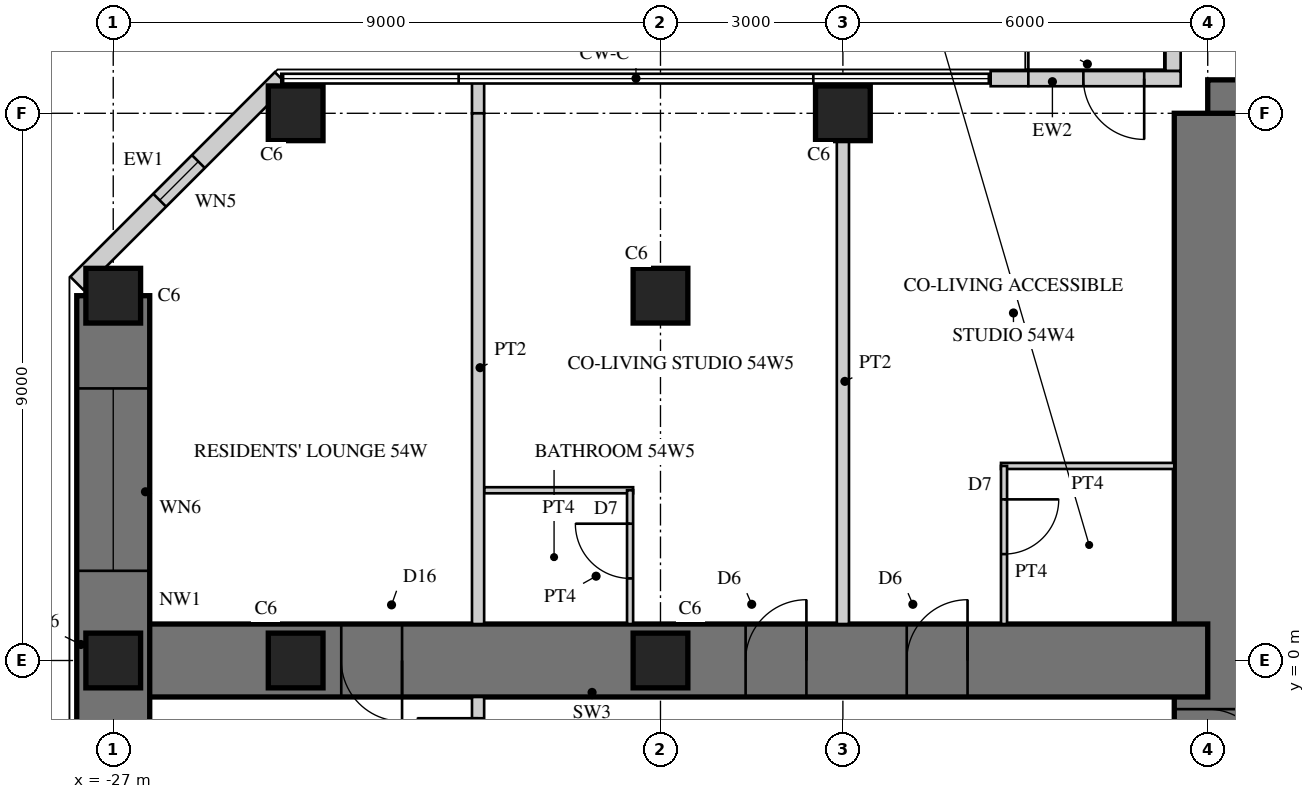
"""IFC4 building model, lengths in metres.
Left out: names, types, materials, properties, quantities, classifications, styles, units other than length and angle.
Written with IfcOpenShell. Run it as: python <this file> out.ifc"""

import sys

from ifc_helpers import new_model, si_unit, direction, frame, frame_2d, origin, origin_2d, place, context, subcontext, project, spatial, rectangle, hollow_rectangle, extrude, element, fill, save


model = new_model("IFC4")
c1 = context("Model", 3, precision=1e-05, world=origin(), true_north=direction((0.0, 1.0)))
c2 = subcontext(c1, "Body", "Model", "MODEL_VIEW")
j1 = project(units=[si_unit("LENGTHUNIT", "METRE"), si_unit("PLANEANGLEUNIT", "RADIAN")], contexts=[c1])
p1 = place(None, origin())
s1 = spatial("IfcSite", under=j1, at=p1, CompositionType="ELEMENT")
p2 = place(p1, origin())
s2 = spatial("IfcBuilding", under=s1, at=p2, CompositionType="ELEMENT")
p3 = place(p2, frame((0.0, 0.0, 213.7)))
s3 = spatial("IfcBuildingStorey", under=s2, at=p3, CompositionType="ELEMENT", Elevation=213.7)
p4 = place(p3, frame((9.0, 9.0, 0.0), z_axis=(0.0, 0.0, 1.0), x_axis=(-1.0, 0.0, 0.0)))
e1 = element("IfcWall", 1, at=p4, inside=s3, PredefinedType="SHEAR", context=c2, shape_type="SweptSolid", body=[
    extrude(rectangle(XDim=18.0, YDim=1.1, at=frame_2d((9.0, 0.0))), origin(), (0.0, 0.0, 1.0), 3.4),
])
p5 = place(p4, frame((9.8, 0.0, 0.0)))
e2 = element("IfcOpeningElement", 2, at=p5, cuts=e1, PredefinedType="OPENING", context=c2, shape_type="SweptSolid", body=[
    extrude(rectangle(XDim=1.0, YDim=2.4, at=frame_2d((0.5, 1.2))), frame((0.0, 0.56, 0.0), z_axis=(0.0, -1.0, 0.0), x_axis=(1.0, 0.0, 0.0)), (0.0, 0.0, 1.0), 1.12),
])
p6 = place(p3, frame((-9.0, 9.0, 0.0), z_axis=(0.0, 0.0, 1.0), x_axis=(0.0, -1.0, 0.0)))
e3 = element("IfcWall", 3, at=p6, inside=s3, PredefinedType="SHEAR", context=c2, shape_type="SweptSolid", body=[
    extrude(rectangle(XDim=18.0, YDim=1.1, at=frame_2d((9.0, 0.0))), origin(), (0.0, 0.0, 1.0), 3.4),
])
p7 = place(p6, frame((9.8, 0.0, 0.0)))
e4 = element("IfcOpeningElement", 4, at=p7, cuts=e3, PredefinedType="OPENING", context=c2, shape_type="SweptSolid", body=[
    extrude(rectangle(XDim=1.0, YDim=2.4, at=frame_2d((0.5, 1.2))), frame((0.0, 0.56, 0.0), z_axis=(0.0, -1.0, 0.0), x_axis=(1.0, 0.0, 0.0)), (0.0, 0.0, 1.0), 1.12),
])
p8 = place(p3, frame((-9.0, 0.0, 0.0), z_axis=(0.0, 0.0, 1.0), x_axis=(-1.0, 0.0, 0.0)))
e5 = element("IfcWall", 5, at=p8, inside=s3, PredefinedType="SHEAR", context=c2, shape_type="SweptSolid", body=[
    extrude(rectangle(XDim=18.0, YDim=1.2, at=frame_2d((9.0, 0.0))), origin(), (0.0, 0.0, 1.0), 3.4),
])
p9 = place(p8, frame((3.95, 0.0, 0.0)))
e6 = element("IfcOpeningElement", 6, at=p9, cuts=e5, PredefinedType="OPENING", context=c2, shape_type="SweptSolid", body=[
    extrude(rectangle(XDim=1.0, YDim=2.15, at=frame_2d((0.5, 1.075))), frame((0.0, 0.61, 0.0), z_axis=(0.0, -1.0, 0.0), x_axis=(1.0, 0.0, 0.0)), (0.0, 0.0, 1.0), 1.22),
])
p10 = place(p8, frame((6.6, 0.0, 0.0)))
e7 = element("IfcOpeningElement", 7, at=p10, cuts=e5, PredefinedType="OPENING", context=c2, shape_type="SweptSolid", body=[
    extrude(rectangle(XDim=1.0, YDim=2.15, at=frame_2d((0.5, 1.075))), frame((0.0, 0.61, 0.0), z_axis=(0.0, -1.0, 0.0), x_axis=(1.0, 0.0, 0.0)), (0.0, 0.0, 1.0), 1.22),
])
p11 = place(p8, frame((13.25, 0.0, 0.0)))
e8 = element("IfcOpeningElement", 8, at=p11, cuts=e5, PredefinedType="OPENING", context=c2, shape_type="SweptSolid", body=[
    extrude(rectangle(XDim=1.0, YDim=2.0, at=frame_2d((0.5, 1.0))), frame((0.0, 0.61, 0.0), z_axis=(0.0, -1.0, 0.0), x_axis=(1.0, 0.0, 0.0)), (0.0, 0.0, 1.0), 1.22),
])
p12 = place(p3, frame((-27.0, 6.0, 0.0), z_axis=(0.0, 0.0, 1.0), x_axis=(0.0, -1.0, 0.0)))
e9 = element("IfcWall", 9, at=p12, inside=s3, PredefinedType="SHEAR", context=c2, shape_type="SweptSolid", body=[
    extrude(rectangle(XDim=12.0, YDim=1.2, at=frame_2d((6.0, 0.0))), origin(), (0.0, 0.0, 1.0), 3.4),
])
p13 = place(p12, frame((1.525, 0.0, 0.6)))
e10 = element("IfcOpeningElement", 10, at=p13, cuts=e9, PredefinedType="OPENING", context=c2, shape_type="SweptSolid", body=[
    extrude(rectangle(XDim=3.0, YDim=2.4, at=frame_2d((1.5, 1.2))), frame((0.0, 0.61, 0.0), z_axis=(0.0, -1.0, 0.0), x_axis=(1.0, 0.0, 0.0)), (0.0, 0.0, 1.0), 1.22),
])
p14 = place(p12, frame((7.475, 0.0, 0.6)))
e11 = element("IfcOpeningElement", 11, at=p14, cuts=e9, PredefinedType="OPENING", context=c2, shape_type="SweptSolid", body=[
    extrude(rectangle(XDim=3.0, YDim=2.4, at=frame_2d((1.5, 1.2))), frame((0.0, 0.61, 0.0), z_axis=(0.0, -1.0, 0.0), x_axis=(1.0, 0.0, 0.0)), (0.0, 0.0, 1.0), 1.22),
])
for number, where, z_axis, x_axis in (
    (12, (-15.0, 9.0, 0.0), (0.0, 0.0, 1.0), (1.0, 0.0, 0.0)),
    (13, (-24.0, 9.0, 0.0), (0.0, 0.0, 1.0), (1.0, 0.0, 0.0)),
    (14, (-27.0, 6.0, 0.0), (0.0, 0.0, 1.0), (1.0, 0.0, 0.0)),
    (15, (-27.0, 0.0, 0.0), (0.0, 0.0, 1.0), (1.0, 0.0, 0.0)),
    (16, (-18.0, 6.0, 0.0), (0.0, 0.0, 1.0), (1.0, 0.0, 0.0)),
    (17, (-18.0, 0.0, 0.0), (0.0, 0.0, 1.0), (1.0, 0.0, 0.0)),
    (18, (-24.0, 0.0, 0.0), (0.0, 0.0, 1.0), (1.0, 0.0, 0.0)),
):
    element("IfcColumn", number, at=place(p3, frame(where, z_axis=z_axis, x_axis=x_axis)), inside=s3, PredefinedType="COLUMN", context=c2, shape_type="SweptSolid", body=[
        extrude(rectangle(XDim=0.9, YDim=0.9, at=origin_2d()), origin(), (0.0, 0.0, 1.0), 3.4),
    ])
p15 = place(p3, frame((-9.57, 12.57, 0.0), z_axis=(0.0, 0.0, 1.0), x_axis=(0.0, -1.0, 0.0)))
e19 = element("IfcWall", 19, at=p15, inside=s3, PredefinedType="SOLIDWALL", context=c2, shape_type="SweptSolid", body=[
    extrude(rectangle(XDim=2.875, YDim=0.25, at=frame_2d((1.438, 0.0))), origin(), (0.0, 0.0, 1.0), 3.15),
])
p16 = place(p15, frame((0.6, 0.0, 0.0)))
e20 = element("IfcOpeningElement", 20, at=p16, cuts=e19, PredefinedType="OPENING", context=c2, shape_type="SweptSolid", body=[
    extrude(rectangle(XDim=1.0, YDim=2.2, at=frame_2d((0.5, 1.1))), frame((0.0, 0.135, 0.0), z_axis=(0.0, -1.0, 0.0), x_axis=(1.0, 0.0, 0.0)), (0.0, 0.0, 1.0), 0.27),
])
p17 = place(p3, frame((-9.445, 9.57, 0.0), z_axis=(0.0, 0.0, 1.0), x_axis=(-1.0, 0.0, 0.0)))
e21 = element("IfcWall", 21, at=p17, inside=s3, PredefinedType="SOLIDWALL", context=c2, shape_type="SweptSolid", body=[
    extrude(rectangle(XDim=3.125, YDim=0.25, at=frame_2d((1.562, 0.0))), origin(), (0.0, 0.0, 1.0), 3.15),
])
p18 = place(p17, frame((0.6, 0.0, 0.0)))
e22 = element("IfcOpeningElement", 22, at=p18, cuts=e21, PredefinedType="OPENING", context=c2, shape_type="SweptSolid", body=[
    extrude(rectangle(XDim=1.0, YDim=2.2, at=frame_2d((0.5, 1.1))), frame((0.0, 0.135, 0.0), z_axis=(0.0, -1.0, 0.0), x_axis=(1.0, 0.0, 0.0)), (0.0, 0.0, 1.0), 0.27),
])
p19 = place(p3, frame((-24.236, 9.57, 0.0), z_axis=(0.0, 0.0, 1.0), x_axis=(-0.707106781187, -0.707106781187, 0.0)))
e23 = element("IfcWall", 23, at=p19, inside=s3, PredefinedType="SOLIDWALL", context=c2, shape_type="SweptSolid", body=[
    extrude(rectangle(XDim=4.757, YDim=0.3, at=frame_2d((2.379, 0.0))), origin(), (0.0, 0.0, 1.0), 3.15),
])
p20 = place(p19, frame((1.929, 0.0, 0.3)))
e24 = element("IfcOpeningElement", 24, at=p20, cuts=e23, PredefinedType="OPENING", context=c2, shape_type="SweptSolid", body=[
    extrude(rectangle(XDim=0.9, YDim=2.4, at=frame_2d((0.45, 1.2))), frame((0.0, 0.16, 0.0), z_axis=(0.0, -1.0, 0.0), x_axis=(1.0, 0.0, 0.0)), (0.0, 0.0, 1.0), 0.32),
])
p21 = place(p3, frame((-9.55, 3.2, 0.0), z_axis=(0.0, 0.0, 1.0), x_axis=(-1.0, 0.0, 0.0)))
e25 = element("IfcWall", 25, at=p21, inside=s3, PredefinedType="PARTITIONING", context=c2, shape_type="SweptSolid", body=[
    extrude(rectangle(XDim=2.85, YDim=0.1, at=frame_2d((1.425, 0.0))), origin(), (0.0, 0.0, 1.0), 3.15),
])
p22 = place(p3, frame((-12.35, 3.2, 0.0), z_axis=(0.0, 0.0, 1.0), x_axis=(0.0, -1.0, 0.0)))
e26 = element("IfcWall", 26, at=p22, inside=s3, PredefinedType="PARTITIONING", context=c2, shape_type="SweptSolid", body=[
    extrude(rectangle(XDim=2.6, YDim=0.1, at=frame_2d((1.3, 0.0))), origin(), (0.0, 0.0, 1.0), 3.15),
])
p23 = place(p22, frame((0.55, 0.0, 0.0)))
e27 = element("IfcOpeningElement", 27, at=p23, cuts=e26, PredefinedType="OPENING", context=c2, shape_type="SweptSolid", body=[
    extrude(rectangle(XDim=0.9, YDim=2.1, at=frame_2d((0.45, 1.05))), frame((0.0, 0.06, 0.0), z_axis=(0.0, -1.0, 0.0), x_axis=(1.0, 0.0, 0.0)), (0.0, 0.0, 1.0), 0.12),
])
p24 = place(p3, frame((-15.0, 8.55, 0.0), z_axis=(0.0, 0.0, 1.0), x_axis=(0.0, -1.0, 0.0)))
e28 = element("IfcWall", 28, at=p24, inside=s3, PredefinedType="SOLIDWALL", context=c2, shape_type="SweptSolid", body=[
    extrude(rectangle(XDim=7.95, YDim=0.2, at=frame_2d((3.975, 0.0))), origin(), (0.0, 0.0, 1.0), 2.1),
])
p25 = place(p3, frame((-18.45, 2.8, 0.0), z_axis=(0.0, 0.0, 1.0), x_axis=(-1.0, 0.0, 0.0)))
e29 = element("IfcWall", 29, at=p25, inside=s3, PredefinedType="PARTITIONING", context=c2, shape_type="SweptSolid", body=[
    extrude(rectangle(XDim=2.45, YDim=0.1, at=frame_2d((1.225, 0.0))), origin(), (0.0, 0.0, 1.0), 3.15),
])
p26 = place(p3, frame((-18.5, 2.8, 0.0), z_axis=(0.0, 0.0, 1.0), x_axis=(0.0, -1.0, 0.0)))
e30 = element("IfcWall", 30, at=p26, inside=s3, PredefinedType="PARTITIONING", context=c2, shape_type="SweptSolid", body=[
    extrude(rectangle(XDim=2.2, YDim=0.1, at=frame_2d((1.1, 0.0))), origin(), (0.0, 0.0, 1.0), 3.15),
])
p27 = place(p26, frame((0.55, 0.0, 0.0)))
e31 = element("IfcOpeningElement", 31, at=p27, cuts=e30, PredefinedType="OPENING", context=c2, shape_type="SweptSolid", body=[
    extrude(rectangle(XDim=0.9, YDim=2.1, at=frame_2d((0.45, 1.05))), frame((0.0, 0.06, 0.0), z_axis=(0.0, -1.0, 0.0), x_axis=(1.0, 0.0, 0.0)), (0.0, 0.0, 1.0), 0.12),
])
p28 = place(p3, frame((-21.0, 9.53, 0.0), z_axis=(0.0, 0.0, 1.0), x_axis=(0.0, -1.0, 0.0)))
e32 = element("IfcWall", 32, at=p28, inside=s3, PredefinedType="SOLIDWALL", context=c2, shape_type="SweptSolid", body=[
    extrude(rectangle(XDim=0.53, YDim=0.2, at=frame_2d((0.265, 0.0))), origin(), (0.0, 0.0, 1.0), 3.15),
])
p29 = place(p3, frame((-21.0, 9.0, 0.0), z_axis=(0.0, 0.0, 1.0), x_axis=(0.0, -1.0, 0.0)))
e33 = element("IfcWall", 33, at=p29, inside=s3, PredefinedType="SOLIDWALL", context=c2, shape_type="SweptSolid", body=[
    extrude(rectangle(XDim=8.4, YDim=0.2, at=frame_2d((4.2, 0.0))), origin(), (0.0, 0.0, 1.0), 2.3),
])
p30 = place(p3, frame((-21.0, -0.6, 0.0), z_axis=(0.0, 0.0, 1.0), x_axis=(0.0, -1.0, 0.0)))
e34 = element("IfcWall", 34, at=p30, inside=s3, PredefinedType="SOLIDWALL", context=c2, shape_type="SweptSolid", body=[
    extrude(rectangle(XDim=8.4, YDim=0.2, at=frame_2d((4.2, 0.0))), origin(), (0.0, 0.0, 1.0), 2.3),
])
p31 = place(p30, frame((0.35, 0.0, 0.0)))
e35 = element("IfcOpeningElement", 35, at=p31, cuts=e34, PredefinedType="OPENING", context=c2, shape_type="SweptSolid", body=[
    extrude(rectangle(XDim=1.0, YDim=2.2, at=frame_2d((0.5, 1.1))), frame((0.0, 0.11, 0.0), z_axis=(0.0, -1.0, 0.0), x_axis=(1.0, 0.0, 0.0)), (0.0, 0.0, 1.0), 0.22),
])
p32 = place(p18, origin())
e36 = element("IfcDoor", 36, at=p32, inside=s3, OperationType="SINGLE_SWING_LEFT", PredefinedType="DOOR", context=c2, shape_type="SweptSolid", body=[
    extrude(hollow_rectangle(XDim=1.0, YDim=2.2, WallThickness=0.06, at=frame_2d((0.5, 1.1))), frame((0.0, 0.025, 0.0), z_axis=(0.0, -1.0, 0.0), x_axis=(1.0, 0.0, 0.0)), (0.0, 0.0, 1.0), 0.05),
    extrude(rectangle(XDim=0.879, YDim=2.079, at=frame_2d((0.5, 1.1))), frame((0.0, 0.025, 0.0), z_axis=(0.0, -1.0, 0.0), x_axis=(1.0, 0.0, 0.0)), (0.0, 0.0, 1.0), 0.05),
])
fill(e22, e36)
p33 = place(p20, origin())
e37 = element("IfcWindow", 37, at=p33, inside=s3, PartitioningType="SINGLE_PANEL", PredefinedType="WINDOW", context=c2, shape_type="SweptSolid", body=[
    extrude(hollow_rectangle(XDim=0.9, YDim=2.4, WallThickness=0.06, at=frame_2d((0.45, 1.2))), frame((0.0, 0.03, 0.0), z_axis=(0.0, -1.0, 0.0), x_axis=(1.0, 0.0, 0.0)), (0.0, 0.0, 1.0), 0.06),
    extrude(rectangle(XDim=0.779, YDim=2.279, at=frame_2d((0.45, 1.2))), frame((0.0, 0.03, 0.0), z_axis=(0.0, -1.0, 0.0), x_axis=(1.0, 0.0, 0.0)), (0.0, 0.0, 1.0), 0.06),
])
fill(e24, e37)
p34 = place(p13, origin())
e38 = element("IfcWindow", 38, at=p34, inside=s3, PartitioningType="SINGLE_PANEL", PredefinedType="WINDOW", context=c2, shape_type="SweptSolid", body=[
    extrude(hollow_rectangle(XDim=3.0, YDim=2.4, WallThickness=0.06, at=frame_2d((1.5, 1.2))), frame((0.0, 0.03, 0.0), z_axis=(0.0, -1.0, 0.0), x_axis=(1.0, 0.0, 0.0)), (0.0, 0.0, 1.0), 0.06),
    extrude(rectangle(XDim=2.879, YDim=2.279, at=frame_2d((1.5, 1.2))), frame((0.0, 0.03, 0.0), z_axis=(0.0, -1.0, 0.0), x_axis=(1.0, 0.0, 0.0)), (0.0, 0.0, 1.0), 0.06),
])
fill(e10, e38)
p35 = place(p23, origin())
e39 = element("IfcDoor", 39, at=p35, inside=s3, OperationType="SINGLE_SWING_LEFT", PredefinedType="DOOR", context=c2, shape_type="SweptSolid", body=[
    extrude(rectangle(XDim=0.9, YDim=2.1, at=frame_2d((0.45, 1.05))), frame((0.0, 0.025, 0.0), z_axis=(0.0, -1.0, 0.0), x_axis=(1.0, 0.0, 0.0)), (0.0, 0.0, 1.0), 0.05),
])
fill(e27, e39)
p36 = place(p27, frame((0.9, 0.0, 0.0), z_axis=(0.0, 0.0, 1.0), x_axis=(-1.0, 0.0, 0.0)))
e40 = element("IfcDoor", 40, at=p36, inside=s3, OperationType="SINGLE_SWING_RIGHT", PredefinedType="DOOR", context=c2, shape_type="SweptSolid", body=[
    extrude(rectangle(XDim=0.9, YDim=2.1, at=frame_2d((0.45, 1.05))), frame((0.0, 0.025, 0.0), z_axis=(0.0, -1.0, 0.0), x_axis=(1.0, 0.0, 0.0)), (0.0, 0.0, 1.0), 0.05),
])
fill(e31, e40)
p37 = place(p31, frame((1.0, 0.0, 0.0), z_axis=(0.0, 0.0, 1.0), x_axis=(-1.0, 0.0, 0.0)))
e41 = element("IfcDoor", 41, at=p37, inside=s3, OperationType="SINGLE_SWING_RIGHT", PredefinedType="DOOR", context=c2, shape_type="SweptSolid", body=[
    extrude(rectangle(XDim=1.0, YDim=2.2, at=frame_2d((0.5, 1.1))), frame((0.0, 0.025, 0.0), z_axis=(0.0, -1.0, 0.0), x_axis=(1.0, 0.0, 0.0)), (0.0, 0.0, 1.0), 0.05),
])
fill(e35, e41)
p38 = place(p9, frame((1.0, 0.0, 0.0), z_axis=(0.0, 0.0, 1.0), x_axis=(-1.0, 0.0, 0.0)))
e42 = element("IfcDoor", 42, at=p38, inside=s3, OperationType="SINGLE_SWING_RIGHT", PredefinedType="DOOR", context=c2, shape_type="SweptSolid", body=[
    extrude(rectangle(XDim=1.0, YDim=2.15, at=frame_2d((0.5, 1.075))), frame((0.0, 0.025, 0.0), z_axis=(0.0, -1.0, 0.0), x_axis=(1.0, 0.0, 0.0)), (0.0, 0.0, 1.0), 0.05),
])
fill(e6, e42)
p39 = place(p10, frame((1.0, 0.0, 0.0), z_axis=(0.0, 0.0, 1.0), x_axis=(-1.0, 0.0, 0.0)))
e43 = element("IfcDoor", 43, at=p39, inside=s3, OperationType="SINGLE_SWING_RIGHT", PredefinedType="DOOR", context=c2, shape_type="SweptSolid", body=[
    extrude(rectangle(XDim=1.0, YDim=2.15, at=frame_2d((0.5, 1.075))), frame((0.0, 0.025, 0.0), z_axis=(0.0, -1.0, 0.0), x_axis=(1.0, 0.0, 0.0)), (0.0, 0.0, 1.0), 0.05),
])
fill(e7, e43)
p40 = place(p11, origin())
e44 = element("IfcDoor", 44, at=p40, inside=s3, OperationType="SINGLE_SWING_LEFT", PredefinedType="DOOR", context=c2, shape_type="SweptSolid", body=[
    extrude(rectangle(XDim=1.0, YDim=2.0, at=frame_2d((0.5, 1.0))), frame((0.0, 0.025, 0.0), z_axis=(0.0, -1.0, 0.0), x_axis=(1.0, 0.0, 0.0)), (0.0, 0.0, 1.0), 0.05),
])
fill(e8, e44)
p41 = place(p7, origin())
e45 = element("IfcDoor", 45, at=p41, inside=s3, OperationType="SINGLE_SWING_RIGHT", PredefinedType="DOOR", context=c2, shape_type="SweptSolid", body=[
    extrude(rectangle(XDim=1.0, YDim=2.4, at=frame_2d((0.5, 1.2))), frame((0.0, 0.055, 0.0), z_axis=(0.0, -1.0, 0.0), x_axis=(1.0, 0.0, 0.0)), (0.0, 0.0, 1.0), 0.05),
])
fill(e4, e45)
save(model, sys.argv[1])
